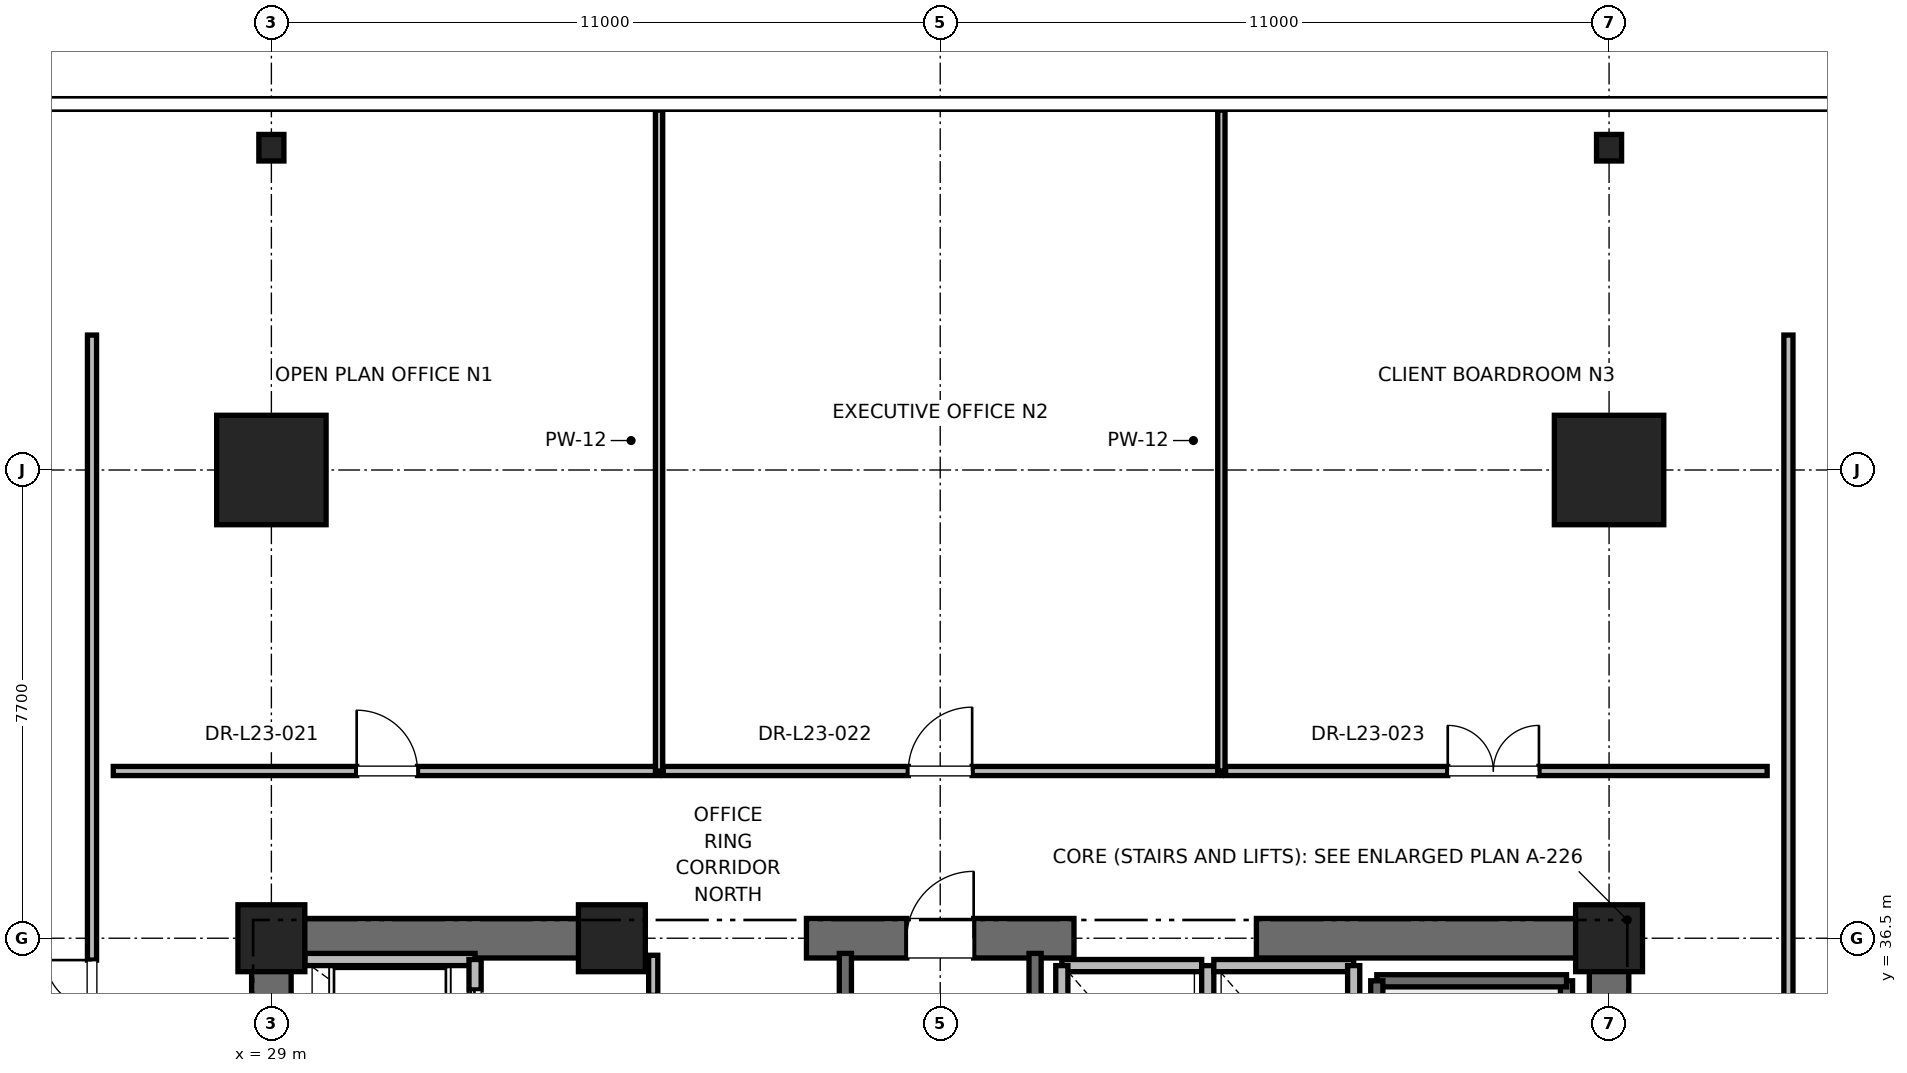
"""IFC4 building model, lengths in metres.
Left out: names, types, materials, properties, quantities, classifications, styles, units other than length and angle.
Written with IfcOpenShell. Run it as: python <this file> out.ifc"""

import sys

from ifc_helpers import new_model, si_unit, direction, frame, frame_2d, origin, origin_2d, place, context, subcontext, project, spatial, rectangle, i_section, extrude, element, fill, save


model = new_model("IFC4")
c1 = context("Model", 3, precision=1e-05, world=origin(), true_north=direction((0.0, 1.0)))
c2 = subcontext(c1, "Body", "Model", "MODEL_VIEW")
j1 = project(units=[si_unit("LENGTHUNIT", "METRE"), si_unit("PLANEANGLEUNIT", "RADIAN")], contexts=[c1])
p1 = place(None, origin())
s1 = spatial("IfcSite", under=j1, at=p1, CompositionType="ELEMENT")
p2 = place(p1, origin())
s2 = spatial("IfcBuilding", under=s1, at=p2, CompositionType="ELEMENT")
p3 = place(p2, frame((0.0, 0.0, 99.6)))
s3 = spatial("IfcBuildingStorey", under=s2, at=p3, CompositionType="ELEMENT", Elevation=99.6)
for number, where, z_axis, x_axis in (
    (1, (29.0, 44.2, 0.0), (0.0, 0.0, 1.0), (1.0, 0.0, 0.0)),
    (2, (51.0, 44.2, 0.0), (0.0, 0.0, 1.0), (1.0, 0.0, 0.0)),
):
    element("IfcColumn", number, at=place(p3, frame(where, z_axis=z_axis, x_axis=x_axis)), inside=s3, PredefinedType="COLUMN", context=c2, shape_type="SweptSolid", body=[
        extrude(rectangle(XDim=1.8, YDim=1.8, at=origin_2d()), origin(), (0.0, 0.0, 1.0), 4.0),
    ])
for number, where, z_axis, x_axis in (
    (3, (29.0, 49.5, 0.0), (0.0, 0.0, 1.0), (1.0, 0.0, 0.0)),
    (4, (51.0, 49.5, 0.0), (0.0, 0.0, 1.0), (1.0, 0.0, 0.0)),
):
    element("IfcColumn", number, at=place(p3, frame(where, z_axis=z_axis, x_axis=x_axis)), inside=s3, PredefinedType="COLUMN", context=c2, shape_type="SweptSolid", body=[
        extrude(i_section(OverallWidth=0.412, OverallDepth=0.437, WebThickness=0.036, FlangeThickness=0.058, FilletRadius=0.015, at=origin_2d()), origin(), (0.0, 0.0, 1.0), 4.0),
    ])
for number, where, z_axis, x_axis in (
    (5, (29.0, 36.5, 0.0), (0.0, 0.0, 1.0), (1.0, 0.0, 0.0)),
    (6, (51.0, 36.5, 0.0), (0.0, 0.0, 1.0), (1.0, 0.0, 0.0)),
    (7, (34.6, 36.5, 0.0), (0.0, 0.0, 1.0), (1.0, 0.0, 0.0)),
):
    element("IfcColumn", number, at=place(p3, frame(where, z_axis=z_axis, x_axis=x_axis)), inside=s3, PredefinedType="PILASTER", context=c2, shape_type="SweptSolid", body=[
        extrude(rectangle(XDim=1.1, YDim=1.1, at=origin_2d()), origin(), (0.0, 0.0, 1.0), 4.0),
    ])
p4 = place(p3, frame((29.0, 36.5, 0.0), z_axis=(0.0, 0.0, 1.0), x_axis=(1.0, 0.0, 0.0)))
e8 = element("IfcWall", 8, at=p4, inside=s3, PredefinedType="SHEAR", context=c2, shape_type="SweptSolid", body=[
    extrude(rectangle(XDim=5.8, YDim=0.65, at=frame_2d((2.9, 0.0))), origin(), (0.0, 0.0, 1.0), 3.76),
])
p5 = place(p3, frame((37.8, 36.5, 0.0), z_axis=(0.0, 0.0, 1.0), x_axis=(1.0, 0.0, 0.0)))
e9 = element("IfcWall", 9, at=p5, inside=s3, PredefinedType="SHEAR", context=c2, shape_type="SweptSolid", body=[
    extrude(rectangle(XDim=4.4, YDim=0.65, at=frame_2d((2.2, 0.0))), origin(), (0.0, 0.0, 1.0), 3.76),
])
p6 = place(p5, frame((1.65, 0.0, 0.0)))
e10 = element("IfcOpeningElement", 10, at=p6, cuts=e9, PredefinedType="OPENING", context=c2, shape_type="SweptSolid", body=[
    extrude(rectangle(XDim=1.1, YDim=2.15, at=frame_2d((0.55, 1.075))), frame((0.0, 0.325, 0.0), z_axis=(0.0, -1.0, 0.0), x_axis=(1.0, 0.0, 0.0)), (0.0, 0.0, 1.0), 0.65),
])
for number, where, z_axis, x_axis in (
    (11, (45.2, 36.5, 0.0), (0.0, 0.0, 1.0), (1.0, 0.0, 0.0)),
    (12, (29.0, 30.7, 0.0), (0.0, 0.0, 1.0), (0.0, 1.0, 0.0)),
):
    element("IfcWall", number, at=place(p3, frame(where, z_axis=z_axis, x_axis=x_axis)), inside=s3, PredefinedType="SHEAR", context=c2, shape_type="SweptSolid", body=[
        extrude(rectangle(XDim=5.8, YDim=0.65, at=frame_2d((2.9, 0.0))), origin(), (0.0, 0.0, 1.0), 3.76),
    ])
p7 = place(p3, frame((51.0, 27.7, 0.0), z_axis=(0.0, 0.0, 1.0), x_axis=(0.0, 1.0, 0.0)))
e13 = element("IfcWall", 13, at=p7, inside=s3, PredefinedType="SHEAR", context=c2, shape_type="SweptSolid", body=[
    extrude(rectangle(XDim=8.8, YDim=0.65, at=frame_2d((4.4, 0.0))), origin(), (0.0, 0.0, 1.0), 3.76),
])
p8 = place(p3, frame((50.3, 27.65, 0.0), z_axis=(0.0, 0.0, 1.0), x_axis=(0.0, 1.0, 0.0)))
e14 = element("IfcWall", 14, at=p8, inside=s3, PredefinedType="SOLIDWALL", context=c2, shape_type="SweptSolid", body=[
    extrude(rectangle(XDim=8.15, YDim=0.2, at=frame_2d((4.075, 0.0))), origin(), (0.0, 0.0, 1.0), 3.76),
])
p9 = place(p3, frame((47.18, 35.8, 0.0), z_axis=(0.0, 0.0, 1.0), x_axis=(1.0, 0.0, 0.0)))
e15 = element("IfcWall", 15, at=p9, inside=s3, PredefinedType="SOLIDWALL", context=c2, shape_type="SweptSolid", body=[
    extrude(rectangle(XDim=3.12, YDim=0.2, at=frame_2d((1.56, 0.0))), origin(), (0.0, 0.0, 1.0), 3.76),
])
p10 = place(p3, frame((47.18, 27.62, 0.0), z_axis=(0.0, 0.0, 1.0), x_axis=(0.0, 1.0, 0.0)))
e16 = element("IfcWall", 16, at=p10, inside=s3, PredefinedType="SOLIDWALL", context=c2, shape_type="SweptSolid", body=[
    extrude(rectangle(XDim=8.18, YDim=0.2, at=frame_2d((4.09, 0.0))), origin(), (0.0, 0.0, 1.0), 3.76),
])
p11 = place(p3, frame((38.44, 27.38, 0.0), z_axis=(0.0, 0.0, 1.0), x_axis=(0.0, 1.0, 0.0)))
e17 = element("IfcWall", 17, at=p11, inside=s3, PredefinedType="SOLIDWALL", context=c2, shape_type="SweptSolid", body=[
    extrude(rectangle(XDim=8.87, YDim=0.2, at=frame_2d((4.435, 0.0))), origin(), (0.0, 0.0, 1.0), 3.76),
])
p12 = place(p3, frame((41.56, 27.68, 0.0), z_axis=(0.0, 0.0, 1.0), x_axis=(0.0, 1.0, 0.0)))
e18 = element("IfcWall", 18, at=p12, inside=s3, PredefinedType="SOLIDWALL", context=c2, shape_type="SweptSolid", body=[
    extrude(rectangle(XDim=8.57, YDim=0.2, at=frame_2d((4.285, 0.0))), origin(), (0.0, 0.0, 1.0), 3.76),
])
p13 = place(p3, frame((32.35, 36.15, 0.0), z_axis=(0.0, 0.0, 1.0), x_axis=(-1.0, 0.0, 0.0)))
e19 = element("IfcWall", 19, at=p13, inside=s3, PredefinedType="SOLIDWALL", context=c2, shape_type="SweptSolid", body=[
    extrude(rectangle(XDim=2.8, YDim=0.2, at=frame_2d((1.4, 0.0))), origin(), (0.0, 0.0, 1.0), 2.889),
])
p14 = place(p3, frame((32.35, 34.05, 0.0), z_axis=(0.0, 0.0, 1.0), x_axis=(0.0, 1.0, 0.0)))
e20 = element("IfcWall", 20, at=p14, inside=s3, PredefinedType="SOLIDWALL", context=c2, shape_type="SweptSolid", body=[
    extrude(rectangle(XDim=2.1, YDim=0.2, at=frame_2d((1.05, 0.0))), origin(), (0.0, 0.0, 1.0), 3.76),
])
p15 = place(p14, frame((0.5, 0.0, 0.0)))
e21 = element("IfcOpeningElement", 21, at=p15, cuts=e20, PredefinedType="OPENING", context=c2, shape_type="SweptSolid", body=[
    extrude(rectangle(XDim=1.1, YDim=2.2, at=frame_2d((0.55, 1.1))), frame((0.0, 0.1, 0.0), z_axis=(0.0, -1.0, 0.0), x_axis=(1.0, 0.0, 0.0)), (0.0, 0.0, 1.0), 0.2),
])
p16 = place(p3, frame((44.3, 36.05, 0.0), z_axis=(0.0, 0.0, 1.0), x_axis=(-1.0, 0.0, 0.0)))
e22 = element("IfcWall", 22, at=p16, inside=s3, PredefinedType="SOLIDWALL", context=c2, shape_type="SweptSolid", body=[
    extrude(rectangle(XDim=2.3, YDim=0.2, at=frame_2d((1.15, 0.0))), origin(), (0.0, 0.0, 1.0), 2.54),
])
for number, where, z_axis, x_axis in (
    (23, (42.0, 36.05, 0.0), (0.0, 0.0, 1.0), (0.0, -1.0, 0.0)),
    (24, (44.4, 33.45, 0.0), (0.0, 0.0, 1.0), (0.0, 1.0, 0.0)),
):
    element("IfcWall", number, at=place(p3, frame(where, z_axis=z_axis, x_axis=x_axis)), inside=s3, PredefinedType="SOLIDWALL", context=c2, shape_type="SweptSolid", body=[
        extrude(rectangle(XDim=2.6, YDim=0.2, at=frame_2d((1.3, 0.0))), origin(), (0.0, 0.0, 1.0), 2.54),
    ])
p17 = place(p3, frame((46.8, 36.05, 0.0), z_axis=(0.0, 0.0, 1.0), x_axis=(-1.0, 0.0, 0.0)))
e25 = element("IfcWall", 25, at=p17, inside=s3, PredefinedType="SOLIDWALL", context=c2, shape_type="SweptSolid", body=[
    extrude(rectangle(XDim=2.3, YDim=0.2, at=frame_2d((1.15, 0.0))), origin(), (0.0, 0.0, 1.0), 2.54),
])
p18 = place(p3, frame((46.8, 33.45, 0.0), z_axis=(0.0, 0.0, 1.0), x_axis=(0.0, 1.0, 0.0)))
e26 = element("IfcWall", 26, at=p18, inside=s3, PredefinedType="SOLIDWALL", context=c2, shape_type="SweptSolid", body=[
    extrude(rectangle(XDim=2.6, YDim=0.2, at=frame_2d((1.3, 0.0))), origin(), (0.0, 0.0, 1.0), 3.76),
])
p19 = place(p3, frame((35.28, 33.95, 0.0), z_axis=(0.0, 0.0, 1.0), x_axis=(0.0, 1.0, 0.0)))
e27 = element("IfcWall", 27, at=p19, inside=s3, PredefinedType="PARTITIONING", context=c2, shape_type="SweptSolid", body=[
    extrude(rectangle(XDim=2.27, YDim=0.15, at=frame_2d((1.135, 0.0))), origin(), (0.0, 0.0, 1.0), 2.54),
])
p20 = place(p19, frame((0.66, 0.0, 0.0)))
e28 = element("IfcOpeningElement", 28, at=p20, cuts=e27, PredefinedType="OPENING", context=c2, shape_type="SweptSolid", body=[
    extrude(rectangle(XDim=0.95, YDim=2.15, at=frame_2d((0.475, 1.075))), frame((0.0, 0.075, 0.0), z_axis=(0.0, -1.0, 0.0), x_axis=(1.0, 0.0, 0.0)), (0.0, 0.0, 1.0), 0.15),
])
p21 = place(p3, frame((26.4, 39.25, 0.0), z_axis=(0.0, 0.0, 1.0), x_axis=(1.0, 0.0, 0.0)))
e29 = element("IfcWall", 29, at=p21, inside=s3, PredefinedType="PARTITIONING", context=c2, shape_type="SweptSolid", body=[
    extrude(rectangle(XDim=8.976, YDim=0.15, at=frame_2d((4.488, 0.0))), origin(), (0.0, 0.0, 1.0), 2.85),
])
p22 = place(p21, frame((4.003, 0.0, 0.0)))
e30 = element("IfcOpeningElement", 30, at=p22, cuts=e29, PredefinedType="OPENING", context=c2, shape_type="SweptSolid", body=[
    extrude(rectangle(XDim=1.0, YDim=2.15, at=frame_2d((0.5, 1.075))), frame((0.0, 0.075, 0.0), z_axis=(0.0, -1.0, 0.0), x_axis=(1.0, 0.0, 0.0)), (0.0, 0.0, 1.0), 0.15),
])
p23 = place(p3, frame((35.376, 39.25, 0.0), z_axis=(0.0, 0.0, 1.0), x_axis=(0.0, 1.0, 0.0)))
e31 = element("IfcWall", 31, at=p23, inside=s3, PredefinedType="PARTITIONING", context=c2, shape_type="SweptSolid", body=[
    extrude(rectangle(XDim=10.869, YDim=0.12, at=frame_2d((5.435, 0.0))), origin(), (0.0, 0.0, 1.0), 2.39),
])
p24 = place(p3, frame((35.446, 39.25, 0.0), z_axis=(0.0, 0.0, 1.0), x_axis=(1.0, 0.0, 0.0)))
e32 = element("IfcWall", 32, at=p24, inside=s3, PredefinedType="PARTITIONING", context=c2, shape_type="SweptSolid", body=[
    extrude(rectangle(XDim=9.178, YDim=0.15, at=frame_2d((4.589, 0.0))), origin(), (0.0, 0.0, 1.0), 2.85),
])
p25 = place(p24, frame((4.029, 0.0, 0.0)))
e33 = element("IfcOpeningElement", 33, at=p25, cuts=e32, PredefinedType="OPENING", context=c2, shape_type="SweptSolid", body=[
    extrude(rectangle(XDim=1.05, YDim=2.2, at=frame_2d((0.525, 1.1))), frame((0.0, 0.075, 0.0), z_axis=(0.0, -1.0, 0.0), x_axis=(1.0, 0.0, 0.0)), (0.0, 0.0, 1.0), 0.15),
])
p26 = place(p3, frame((44.624, 39.25, 0.0), z_axis=(0.0, 0.0, 1.0), x_axis=(0.0, 1.0, 0.0)))
e34 = element("IfcWall", 34, at=p26, inside=s3, PredefinedType="PARTITIONING", context=c2, shape_type="SweptSolid", body=[
    extrude(rectangle(XDim=10.869, YDim=0.12, at=frame_2d((5.435, 0.0))), origin(), (0.0, 0.0, 1.0), 2.39),
])
p27 = place(p3, frame((44.694, 39.25, 0.0), z_axis=(0.0, 0.0, 1.0), x_axis=(1.0, 0.0, 0.0)))
e35 = element("IfcWall", 35, at=p27, inside=s3, PredefinedType="PARTITIONING", context=c2, shape_type="SweptSolid", body=[
    extrude(rectangle(XDim=8.906, YDim=0.15, at=frame_2d((4.453, 0.0))), origin(), (0.0, 0.0, 1.0), 2.85),
])
p28 = place(p27, frame((3.653, 0.0, 0.0)))
e36 = element("IfcOpeningElement", 36, at=p28, cuts=e35, PredefinedType="OPENING", context=c2, shape_type="SweptSolid", body=[
    extrude(rectangle(XDim=1.5, YDim=2.25, at=frame_2d((0.75, 1.125))), frame((0.0, 0.075, 0.0), z_axis=(0.0, -1.0, 0.0), x_axis=(1.0, 0.0, 0.0)), (0.0, 0.0, 1.0), 0.15),
])
p29 = place(p3, frame((26.05, 34.381, 0.0), z_axis=(0.0, 0.0, 1.0), x_axis=(0.0, 1.0, 0.0)))
e37 = element("IfcWall", 37, at=p29, inside=s3, PredefinedType="PARTITIONING", context=c2, shape_type="SweptSolid", body=[
    extrude(rectangle(XDim=12.038, YDim=0.15, at=frame_2d((6.019, 0.0))), origin(), (0.0, 0.0, 1.0), 2.85),
])
p30 = place(p29, frame((0.26, 0.0, 0.0)))
e38 = element("IfcOpeningElement", 38, at=p30, cuts=e37, PredefinedType="OPENING", context=c2, shape_type="SweptSolid", body=[
    extrude(rectangle(XDim=1.5, YDim=2.25, at=frame_2d((0.75, 1.125))), frame((0.0, 0.075, 0.0), z_axis=(0.0, -1.0, 0.0), x_axis=(1.0, 0.0, 0.0)), (0.0, 0.0, 1.0), 0.15),
])
p31 = place(p3, frame((53.95, 24.543, 0.0), z_axis=(0.0, 0.0, 1.0), x_axis=(0.0, 1.0, 0.0)))
e39 = element("IfcWall", 39, at=p31, inside=s3, PredefinedType="PARTITIONING", context=c2, shape_type="SweptSolid", body=[
    extrude(rectangle(XDim=21.876, YDim=0.15, at=frame_2d((10.938, 0.0))), origin(), (0.0, 0.0, 1.0), 2.85),
])
p32 = place(p31, frame((5.428, 0.0, 0.0)))
e40 = element("IfcOpeningElement", 40, at=p32, cuts=e39, PredefinedType="OPENING", context=c2, shape_type="SweptSolid", body=[
    extrude(rectangle(XDim=1.0, YDim=2.15, at=frame_2d((0.5, 1.075))), frame((0.0, 0.075, 0.0), z_axis=(0.0, -1.0, 0.0), x_axis=(1.0, 0.0, 0.0)), (0.0, 0.0, 1.0), 0.15),
])
p33 = place(p6, origin())
e41 = element("IfcDoor", 41, at=p33, inside=s3, OperationType="SINGLE_SWING_RIGHT", PredefinedType="DOOR", context=c2, shape_type="SweptSolid", body=[
    extrude(rectangle(XDim=1.1, YDim=2.15, at=frame_2d((0.55, 1.075))), frame((0.0, 0.025, 0.0), z_axis=(0.0, -1.0, 0.0), x_axis=(1.0, 0.0, 0.0)), (0.0, 0.0, 1.0), 0.05),
])
fill(e10, e41)
p34 = place(p15, origin())
e42 = element("IfcDoor", 42, at=p34, inside=s3, OperationType="SLIDING_TO_RIGHT", PredefinedType="DOOR", context=c2, shape_type="SweptSolid", body=[
    extrude(rectangle(XDim=1.1, YDim=2.2, at=frame_2d((0.55, 1.1))), frame((0.0, 0.025, 0.0), z_axis=(0.0, -1.0, 0.0), x_axis=(1.0, 0.0, 0.0)), (0.0, 0.0, 1.0), 0.05),
])
fill(e21, e42)
p35 = place(p22, origin())
e43 = element("IfcDoor", 43, at=p35, inside=s3, OperationType="SINGLE_SWING_LEFT", PredefinedType="DOOR", context=c2, shape_type="SweptSolid", body=[
    extrude(rectangle(XDim=1.0, YDim=2.15, at=frame_2d((0.5, 1.075))), frame((0.0, 0.025, 0.0), z_axis=(0.0, -1.0, 0.0), x_axis=(1.0, 0.0, 0.0)), (0.0, 0.0, 1.0), 0.05),
])
fill(e30, e43)
p36 = place(p25, origin())
e44 = element("IfcDoor", 44, at=p36, inside=s3, OperationType="SINGLE_SWING_RIGHT", PredefinedType="DOOR", context=c2, shape_type="SweptSolid", body=[
    extrude(rectangle(XDim=1.05, YDim=2.2, at=frame_2d((0.525, 1.1))), frame((0.0, 0.025, 0.0), z_axis=(0.0, -1.0, 0.0), x_axis=(1.0, 0.0, 0.0)), (0.0, 0.0, 1.0), 0.05),
])
fill(e33, e44)
p37 = place(p28, origin())
e45 = element("IfcDoor", 45, at=p37, inside=s3, OperationType="DOUBLE_DOOR_SINGLE_SWING", PredefinedType="DOOR", context=c2, shape_type="SweptSolid", body=[
    extrude(rectangle(XDim=1.5, YDim=2.25, at=frame_2d((0.75, 1.125))), frame((0.0, 0.025, 0.0), z_axis=(0.0, -1.0, 0.0), x_axis=(1.0, 0.0, 0.0)), (0.0, 0.0, 1.0), 0.05),
])
fill(e36, e45)
p38 = place(p30, origin())
e46 = element("IfcDoor", 46, at=p38, inside=s3, OperationType="DOUBLE_DOOR_SINGLE_SWING", PredefinedType="DOOR", context=c2, shape_type="SweptSolid", body=[
    extrude(rectangle(XDim=1.5, YDim=2.25, at=frame_2d((0.75, 1.125))), frame((0.0, 0.025, 0.0), z_axis=(0.0, -1.0, 0.0), x_axis=(1.0, 0.0, 0.0)), (0.0, 0.0, 1.0), 0.05),
])
fill(e38, e46)
save(model, sys.argv[1])
